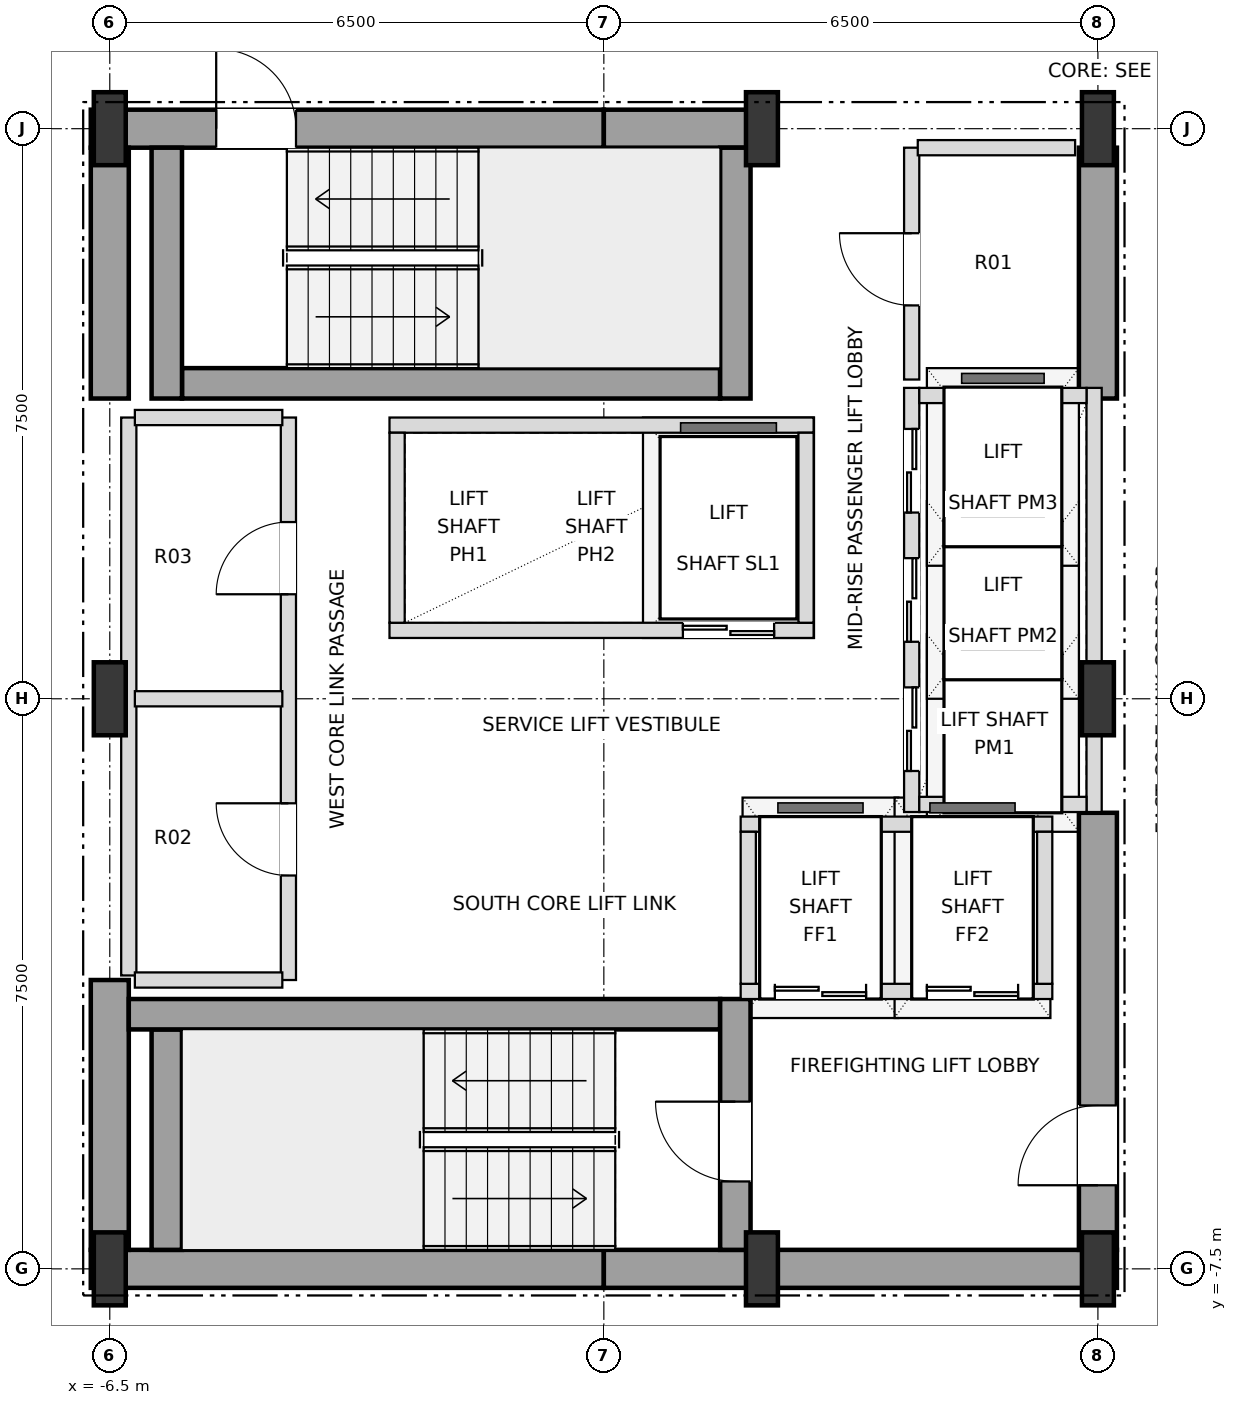
"""IFC4 building model, lengths in metres.
Left out: names, types, materials, properties, quantities, classifications, styles, units other than length and angle.
Written with IfcOpenShell. Run it as: python <this file> out.ifc"""

import sys

from ifc_helpers import new_model, si_unit, direction, frame, frame_2d, origin, origin_2d, place, context, subcontext, project, spatial, rectangle, i_section, extrude, element, fill, save


model = new_model("IFC4")
c1 = context("Model", 3, precision=1e-05, world=origin(), true_north=direction((0.0, 1.0)))
c2 = subcontext(c1, "Body", "Model", "MODEL_VIEW")
j1 = project(units=[si_unit("LENGTHUNIT", "METRE"), si_unit("PLANEANGLEUNIT", "RADIAN")], contexts=[c1])
p1 = place(None, origin())
s1 = spatial("IfcSite", under=j1, at=p1, CompositionType="ELEMENT")
p2 = place(p1, origin())
s2 = spatial("IfcBuilding", under=s1, at=p2, CompositionType="ELEMENT")
p3 = place(p2, frame((0.0, 0.0, 140.4)))
s3 = spatial("IfcBuildingStorey", under=s2, at=p3, CompositionType="ELEMENT", Elevation=140.4)
for number, where, z_axis, x_axis in (
    (1, (-6.5, -7.5, 0.0), (0.0, 0.0, 1.0), (1.0, 0.0, 0.0)),
    (2, (2.08, -7.5, 0.0), (0.0, 0.0, 1.0), (1.0, 0.0, 0.0)),
    (3, (6.5, -7.5, 0.0), (0.0, 0.0, 1.0), (1.0, 0.0, 0.0)),
    (4, (-6.5, 0.0, 0.0), (0.0, 0.0, 1.0), (1.0, 0.0, 0.0)),
    (5, (6.5, 0.0, 0.0), (0.0, 0.0, 1.0), (1.0, 0.0, 0.0)),
    (6, (-6.5, 7.5, 0.0), (0.0, 0.0, 1.0), (1.0, 0.0, 0.0)),
    (7, (2.08, 7.5, 0.0), (0.0, 0.0, 1.0), (1.0, 0.0, 0.0)),
    (8, (6.5, 7.5, 0.0), (0.0, 0.0, 1.0), (1.0, 0.0, 0.0)),
):
    element("IfcColumn", number, at=place(p3, frame(where, z_axis=z_axis, x_axis=x_axis)), inside=s3, PredefinedType="COLUMN", context=c2, shape_type="SweptSolid", body=[
        extrude(i_section(OverallWidth=0.42, OverallDepth=0.96, WebThickness=0.022, FlangeThickness=0.034, at=origin_2d()), origin(), (0.0, 0.0, 1.0), 3.6),
    ])
for number, where, z_axis, x_axis in (
    (9, (-6.75, -7.5, 0.0), (0.0, 0.0, 1.0), (1.0, 0.0, 0.0)),
    (10, (0.0, -7.5, 0.0), (0.0, 0.0, 1.0), (1.0, 0.0, 0.0)),
):
    element("IfcWall", number, at=place(p3, frame(where, z_axis=z_axis, x_axis=x_axis)), inside=s3, PredefinedType="SHEAR", context=c2, shape_type="SweptSolid", body=[
        extrude(rectangle(XDim=6.75, YDim=0.5, at=frame_2d((3.375, 0.0))), origin(), (0.0, 0.0, 1.0), 3.38),
    ])
p4 = place(p3, frame((-6.75, 7.5, 0.0), z_axis=(0.0, 0.0, 1.0), x_axis=(1.0, 0.0, 0.0)))
e11 = element("IfcWall", 11, at=p4, inside=s3, PredefinedType="SHEAR", context=c2, shape_type="SweptSolid", body=[
    extrude(rectangle(XDim=6.75, YDim=0.5, at=frame_2d((3.375, 0.0))), origin(), (0.0, 0.0, 1.0), 3.38),
])
p5 = place(p4, frame((1.65, 0.0, 0.0)))
e12 = element("IfcOpeningElement", 12, at=p5, cuts=e11, PredefinedType="OPENING", context=c2, shape_type="SweptSolid", body=[
    extrude(rectangle(XDim=1.05, YDim=2.15, at=frame_2d((0.525, 1.075))), frame((0.0, 0.26, 0.0), z_axis=(0.0, -1.0, 0.0), x_axis=(1.0, 0.0, 0.0)), (0.0, 0.0, 1.0), 0.52),
])
p6 = place(p3, frame((0.0, 7.5, 0.0), z_axis=(0.0, 0.0, 1.0), x_axis=(1.0, 0.0, 0.0)))
e13 = element("IfcWall", 13, at=p6, inside=s3, PredefinedType="SHEAR", context=c2, shape_type="SweptSolid", body=[
    extrude(rectangle(XDim=2.08, YDim=0.5, at=frame_2d((1.04, 0.0))), origin(), (0.0, 0.0, 1.0), 3.38),
])
p7 = place(p3, frame((-6.5, -7.25, 0.0), z_axis=(0.0, 0.0, 1.0), x_axis=(0.0, 1.0, 0.0)))
e14 = element("IfcWall", 14, at=p7, inside=s3, PredefinedType="SHEAR", context=c2, shape_type="SweptSolid", body=[
    extrude(rectangle(XDim=3.55, YDim=0.5, at=frame_2d((1.775, 0.0))), origin(), (0.0, 0.0, 1.0), 3.38),
])
p8 = place(p3, frame((-6.5, 3.95, 0.0), z_axis=(0.0, 0.0, 1.0), x_axis=(0.0, 1.0, 0.0)))
e15 = element("IfcWall", 15, at=p8, inside=s3, PredefinedType="SHEAR", context=c2, shape_type="SweptSolid", body=[
    extrude(rectangle(XDim=3.3, YDim=0.5, at=frame_2d((1.65, 0.0))), origin(), (0.0, 0.0, 1.0), 3.38),
])
p9 = place(p3, frame((6.5, -7.25, 0.0), z_axis=(0.0, 0.0, 1.0), x_axis=(0.0, 1.0, 0.0)))
e16 = element("IfcWall", 16, at=p9, inside=s3, PredefinedType="SHEAR", context=c2, shape_type="SweptSolid", body=[
    extrude(rectangle(XDim=5.75, YDim=0.5, at=frame_2d((2.875, 0.0))), origin(), (0.0, 0.0, 1.0), 3.38),
])
p10 = place(p9, frame((0.85, 0.0, 0.0)))
e17 = element("IfcOpeningElement", 17, at=p10, cuts=e16, PredefinedType="OPENING", context=c2, shape_type="SweptSolid", body=[
    extrude(rectangle(XDim=1.05, YDim=2.15, at=frame_2d((0.525, 1.075))), frame((0.0, 0.26, 0.0), z_axis=(0.0, -1.0, 0.0), x_axis=(1.0, 0.0, 0.0)), (0.0, 0.0, 1.0), 0.52),
])
p11 = place(p3, frame((6.5, 3.95, 0.0), z_axis=(0.0, 0.0, 1.0), x_axis=(0.0, 1.0, 0.0)))
e18 = element("IfcWall", 18, at=p11, inside=s3, PredefinedType="SHEAR", context=c2, shape_type="SweptSolid", body=[
    extrude(rectangle(XDim=3.3, YDim=0.5, at=frame_2d((1.65, 0.0))), origin(), (0.0, 0.0, 1.0), 3.38),
])
p12 = place(p3, frame((-5.75, -7.25, 0.0), z_axis=(0.0, 0.0, 1.0), x_axis=(0.0, 1.0, 0.0)))
e19 = element("IfcWall", 19, at=p12, inside=s3, PredefinedType="SHEAR", context=c2, shape_type="SweptSolid", body=[
    extrude(rectangle(XDim=2.9, YDim=0.4, at=frame_2d((1.45, 0.0))), origin(), (0.0, 0.0, 1.0), 3.38),
])
p13 = place(p3, frame((-6.25, -4.15, 0.0), z_axis=(0.0, 0.0, 1.0), x_axis=(1.0, 0.0, 0.0)))
e20 = element("IfcWall", 20, at=p13, inside=s3, PredefinedType="SHEAR", context=c2, shape_type="SweptSolid", body=[
    extrude(rectangle(XDim=7.78, YDim=0.4, at=frame_2d((3.89, 0.0))), origin(), (0.0, 0.0, 1.0), 3.38),
])
p14 = place(p3, frame((1.73, -7.25, 0.0), z_axis=(0.0, 0.0, 1.0), x_axis=(0.0, 1.0, 0.0)))
e21 = element("IfcWall", 21, at=p14, inside=s3, PredefinedType="SHEAR", context=c2, shape_type="SweptSolid", body=[
    extrude(rectangle(XDim=3.3, YDim=0.4, at=frame_2d((1.65, 0.0))), origin(), (0.0, 0.0, 1.0), 3.38),
])
p15 = place(p14, frame((0.9, 0.0, 0.0)))
e22 = element("IfcOpeningElement", 22, at=p15, cuts=e21, PredefinedType="OPENING", context=c2, shape_type="SweptSolid", body=[
    extrude(rectangle(XDim=1.05, YDim=2.15, at=frame_2d((0.525, 1.075))), frame((0.0, 0.21, 0.0), z_axis=(0.0, -1.0, 0.0), x_axis=(1.0, 0.0, 0.0)), (0.0, 0.0, 1.0), 0.42),
])
p16 = place(p3, frame((-5.55, 4.15, 0.0), z_axis=(0.0, 0.0, 1.0), x_axis=(1.0, 0.0, 0.0)))
e23 = element("IfcWall", 23, at=p16, inside=s3, PredefinedType="SHEAR", context=c2, shape_type="SweptSolid", body=[
    extrude(rectangle(XDim=7.08, YDim=0.4, at=frame_2d((3.54, 0.0))), origin(), (0.0, 0.0, 1.0), 3.38),
])
for number, where, z_axis, x_axis in (
    (24, (1.73, 3.95, 0.0), (0.0, 0.0, 1.0), (0.0, 1.0, 0.0)),
    (25, (-5.75, 3.95, 0.0), (0.0, 0.0, 1.0), (0.0, 1.0, 0.0)),
):
    element("IfcWall", number, at=place(p3, frame(where, z_axis=z_axis, x_axis=x_axis)), inside=s3, PredefinedType="SHEAR", context=c2, shape_type="SweptSolid", body=[
        extrude(rectangle(XDim=3.3, YDim=0.4, at=frame_2d((1.65, 0.0))), origin(), (0.0, 0.0, 1.0), 3.38),
    ])
p17 = place(p3, frame((4.05, -1.49, 0.0), z_axis=(0.0, 0.0, 1.0), x_axis=(0.0, 1.0, 0.0)))
e26 = element("IfcWall", 26, at=p17, inside=s3, PredefinedType="SOLIDWALL", context=c2, shape_type="SweptSolid", body=[
    extrude(rectangle(XDim=5.58, YDim=0.2, at=frame_2d((2.79, 0.0))), origin(), (0.0, 0.0, 1.0), 3.38),
])
p18 = place(p17, frame((0.54, 0.0, 0.0)))
e27 = element("IfcOpeningElement", 27, at=p18, cuts=e26, PredefinedType="OPENING", context=c2, shape_type="SweptSolid", body=[
    extrude(rectangle(XDim=1.1, YDim=2.15, at=frame_2d((0.55, 1.075))), frame((0.0, 0.11, 0.0), z_axis=(0.0, -1.0, 0.0), x_axis=(1.0, 0.0, 0.0)), (0.0, 0.0, 1.0), 0.22),
])
p19 = place(p17, frame((2.24, 0.0, 0.0)))
e28 = element("IfcOpeningElement", 28, at=p19, cuts=e26, PredefinedType="OPENING", context=c2, shape_type="SweptSolid", body=[
    extrude(rectangle(XDim=1.1, YDim=2.15, at=frame_2d((0.55, 1.075))), frame((0.0, 0.11, 0.0), z_axis=(0.0, -1.0, 0.0), x_axis=(1.0, 0.0, 0.0)), (0.0, 0.0, 1.0), 0.22),
])
p20 = place(p17, frame((3.94, 0.0, 0.0)))
e29 = element("IfcOpeningElement", 29, at=p20, cuts=e26, PredefinedType="OPENING", context=c2, shape_type="SweptSolid", body=[
    extrude(rectangle(XDim=1.1, YDim=2.15, at=frame_2d((0.55, 1.075))), frame((0.0, 0.11, 0.0), z_axis=(0.0, -1.0, 0.0), x_axis=(1.0, 0.0, 0.0)), (0.0, 0.0, 1.0), 0.22),
])
p21 = place(p3, frame((6.45, -1.49, 0.0), z_axis=(0.0, 0.0, 1.0), x_axis=(0.0, 1.0, 0.0)))
e30 = element("IfcWall", 30, at=p21, inside=s3, PredefinedType="SOLIDWALL", context=c2, shape_type="SweptSolid", body=[
    extrude(rectangle(XDim=5.58, YDim=0.2, at=frame_2d((2.79, 0.0))), origin(), (0.0, 0.0, 1.0), 2.816),
])
for number, where, z_axis, x_axis in (
    (31, (4.15, -1.39, 0.0), (0.0, 0.0, 1.0), (1.0, 0.0, 0.0)),
    (32, (4.15, 3.99, 0.0), (0.0, 0.0, 1.0), (1.0, 0.0, 0.0)),
):
    element("IfcWall", number, at=place(p3, frame(where, z_axis=z_axis, x_axis=x_axis)), inside=s3, PredefinedType="SOLIDWALL", context=c2, shape_type="SweptSolid", body=[
        extrude(rectangle(XDim=2.2, YDim=0.2, at=frame_2d((1.1, 0.0))), origin(), (0.0, 0.0, 1.0), 3.38),
    ])
p22 = place(p3, frame((-2.82, 0.9, 0.0), z_axis=(0.0, 0.0, 1.0), x_axis=(1.0, 0.0, 0.0)))
e33 = element("IfcWall", 33, at=p22, inside=s3, PredefinedType="SOLIDWALL", context=c2, shape_type="SweptSolid", body=[
    extrude(rectangle(XDim=5.58, YDim=0.2, at=frame_2d((2.79, 0.0))), origin(), (0.0, 0.0, 1.0), 3.38),
])
p23 = place(p22, frame((3.86, 0.0, 0.0)))
e34 = element("IfcOpeningElement", 34, at=p23, cuts=e33, PredefinedType="OPENING", context=c2, shape_type="SweptSolid", body=[
    extrude(rectangle(XDim=1.2, YDim=2.2, at=frame_2d((0.6, 1.1))), frame((0.0, 0.11, 0.0), z_axis=(0.0, -1.0, 0.0), x_axis=(1.0, 0.0, 0.0)), (0.0, 0.0, 1.0), 0.22),
])
p24 = place(p3, frame((-2.82, 3.6, 0.0), z_axis=(0.0, 0.0, 1.0), x_axis=(1.0, 0.0, 0.0)))
e35 = element("IfcWall", 35, at=p24, inside=s3, PredefinedType="SOLIDWALL", context=c2, shape_type="SweptSolid", body=[
    extrude(rectangle(XDim=5.58, YDim=0.2, at=frame_2d((2.79, 0.0))), origin(), (0.0, 0.0, 1.0), 3.38),
])
for number, where, z_axis, x_axis in (
    (36, (-2.72, 1.0, 0.0), (0.0, 0.0, 1.0), (0.0, 1.0, 0.0)),
    (37, (2.66, 1.0, 0.0), (0.0, 0.0, 1.0), (0.0, 1.0, 0.0)),
):
    element("IfcWall", number, at=place(p3, frame(where, z_axis=z_axis, x_axis=x_axis)), inside=s3, PredefinedType="SOLIDWALL", context=c2, shape_type="SweptSolid", body=[
        extrude(rectangle(XDim=2.5, YDim=0.2, at=frame_2d((1.25, 0.0))), origin(), (0.0, 0.0, 1.0), 3.38),
    ])
p25 = place(p3, frame((1.8, -3.85, 0.0), z_axis=(0.0, 0.0, 1.0), x_axis=(1.0, 0.0, 0.0)))
e38 = element("IfcWall", 38, at=p25, inside=s3, PredefinedType="SOLIDWALL", context=c2, shape_type="SweptSolid", body=[
    extrude(rectangle(XDim=4.1, YDim=0.2, at=frame_2d((2.05, 0.0))), origin(), (0.0, 0.0, 1.0), 3.38),
])
p26 = place(p25, frame((0.45, 0.0, 0.0)))
e39 = element("IfcOpeningElement", 39, at=p26, cuts=e38, PredefinedType="OPENING", context=c2, shape_type="SweptSolid", body=[
    extrude(rectangle(XDim=1.2, YDim=2.2, at=frame_2d((0.6, 1.1))), frame((0.0, 0.11, 0.0), z_axis=(0.0, -1.0, 0.0), x_axis=(1.0, 0.0, 0.0)), (0.0, 0.0, 1.0), 0.22),
])
p27 = place(p25, frame((2.45, 0.0, 0.0)))
e40 = element("IfcOpeningElement", 40, at=p27, cuts=e38, PredefinedType="OPENING", context=c2, shape_type="SweptSolid", body=[
    extrude(rectangle(XDim=1.2, YDim=2.2, at=frame_2d((0.6, 1.1))), frame((0.0, 0.11, 0.0), z_axis=(0.0, -1.0, 0.0), x_axis=(1.0, 0.0, 0.0)), (0.0, 0.0, 1.0), 0.22),
])
p28 = place(p3, frame((1.8, -1.65, 0.0), z_axis=(0.0, 0.0, 1.0), x_axis=(1.0, 0.0, 0.0)))
e41 = element("IfcWall", 41, at=p28, inside=s3, PredefinedType="SOLIDWALL", context=c2, shape_type="SweptSolid", body=[
    extrude(rectangle(XDim=4.1, YDim=0.2, at=frame_2d((2.05, 0.0))), origin(), (0.0, 0.0, 1.0), 3.38),
])
for number, where, z_axis, x_axis in (
    (42, (1.9, -3.75, 0.0), (0.0, 0.0, 1.0), (0.0, 1.0, 0.0)),
    (43, (5.8, -3.75, 0.0), (0.0, 0.0, 1.0), (0.0, 1.0, 0.0)),
):
    element("IfcWall", number, at=place(p3, frame(where, z_axis=z_axis, x_axis=x_axis)), inside=s3, PredefinedType="SOLIDWALL", context=c2, shape_type="SweptSolid", body=[
        extrude(rectangle(XDim=2.0, YDim=0.2, at=frame_2d((1.0, 0.0))), origin(), (0.0, 0.0, 1.0), 3.38),
    ])
p29 = place(p3, frame((-6.25, -3.64, 0.0), z_axis=(0.0, 0.0, 1.0), x_axis=(0.0, 1.0, 0.0)))
e44 = element("IfcWall", 44, at=p29, inside=s3, PredefinedType="SOLIDWALL", context=c2, shape_type="SweptSolid", body=[
    extrude(rectangle(XDim=7.34, YDim=0.2, at=frame_2d((3.67, 0.0))), origin(), (0.0, 0.0, 1.0), 3.38),
])
p30 = place(p3, frame((-4.15, -3.7, 0.0), z_axis=(0.0, 0.0, 1.0), x_axis=(0.0, 1.0, 0.0)))
e45 = element("IfcWall", 45, at=p30, inside=s3, PredefinedType="SOLIDWALL", context=c2, shape_type="SweptSolid", body=[
    extrude(rectangle(XDim=7.4, YDim=0.2, at=frame_2d((3.7, 0.0))), origin(), (0.0, 0.0, 1.0), 3.38),
])
p31 = place(p30, frame((1.375, 0.0, 0.0)))
e46 = element("IfcOpeningElement", 46, at=p31, cuts=e45, PredefinedType="OPENING", context=c2, shape_type="SweptSolid", body=[
    extrude(rectangle(XDim=0.95, YDim=2.15, at=frame_2d((0.475, 1.075))), frame((0.0, 0.11, 0.0), z_axis=(0.0, -1.0, 0.0), x_axis=(1.0, 0.0, 0.0)), (0.0, 0.0, 1.0), 0.22),
])
p32 = place(p30, frame((5.075, 0.0, 0.0)))
e47 = element("IfcOpeningElement", 47, at=p32, cuts=e45, PredefinedType="OPENING", context=c2, shape_type="SweptSolid", body=[
    extrude(rectangle(XDim=0.95, YDim=2.15, at=frame_2d((0.475, 1.075))), frame((0.0, 0.11, 0.0), z_axis=(0.0, -1.0, 0.0), x_axis=(1.0, 0.0, 0.0)), (0.0, 0.0, 1.0), 0.22),
])
p33 = place(p3, frame((4.05, 4.2, 0.0), z_axis=(0.0, 0.0, 1.0), x_axis=(0.0, 1.0, 0.0)))
e48 = element("IfcWall", 48, at=p33, inside=s3, PredefinedType="SOLIDWALL", context=c2, shape_type="SweptSolid", body=[
    extrude(rectangle(XDim=3.05, YDim=0.2, at=frame_2d((1.525, 0.0))), origin(), (0.0, 0.0, 1.0), 3.38),
])
p34 = place(p33, frame((0.975, 0.0, 0.0)))
e49 = element("IfcOpeningElement", 49, at=p34, cuts=e48, PredefinedType="OPENING", context=c2, shape_type="SweptSolid", body=[
    extrude(rectangle(XDim=0.95, YDim=2.15, at=frame_2d((0.475, 1.075))), frame((0.0, 0.11, 0.0), z_axis=(0.0, -1.0, 0.0), x_axis=(1.0, 0.0, 0.0)), (0.0, 0.0, 1.0), 0.22),
])
for number, where, z_axis, x_axis in (
    (50, (-6.17, -3.7, 0.0), (0.0, 0.0, 1.0), (1.0, 0.0, 0.0)),
    (51, (-6.17, 0.0, 0.0), (0.0, 0.0, 1.0), (1.0, 0.0, 0.0)),
    (52, (-6.17, 3.7, 0.0), (0.0, 0.0, 1.0), (1.0, 0.0, 0.0)),
):
    element("IfcWall", number, at=place(p3, frame(where, z_axis=z_axis, x_axis=x_axis)), inside=s3, PredefinedType="SOLIDWALL", context=c2, shape_type="SweptSolid", body=[
        extrude(rectangle(XDim=1.94, YDim=0.2, at=frame_2d((0.97, 0.0))), origin(), (0.0, 0.0, 1.0), 3.38),
    ])
p35 = place(p3, frame((4.13, 7.25, 0.0), z_axis=(0.0, 0.0, 1.0), x_axis=(1.0, 0.0, 0.0)))
e53 = element("IfcWall", 53, at=p35, inside=s3, PredefinedType="SOLIDWALL", context=c2, shape_type="SweptSolid", body=[
    extrude(rectangle(XDim=2.07, YDim=0.2, at=frame_2d((1.035, 0.0))), origin(), (0.0, 0.0, 1.0), 3.38),
])
p36 = place(p10, origin())
e54 = element("IfcDoor", 54, at=p36, inside=s3, OperationType="SINGLE_SWING_LEFT", PredefinedType="DOOR", context=c2, shape_type="SweptSolid", body=[
    extrude(rectangle(XDim=1.05, YDim=2.15, at=frame_2d((0.525, 1.075))), frame((0.0, 0.025, 0.0), z_axis=(0.0, -1.0, 0.0), x_axis=(1.0, 0.0, 0.0)), (0.0, 0.0, 1.0), 0.05),
])
fill(e17, e54)
p37 = place(p15, origin())
e55 = element("IfcDoor", 55, at=p37, inside=s3, OperationType="SINGLE_SWING_RIGHT", PredefinedType="DOOR", context=c2, shape_type="SweptSolid", body=[
    extrude(rectangle(XDim=1.05, YDim=2.15, at=frame_2d((0.525, 1.075))), frame((0.0, 0.025, 0.0), z_axis=(0.0, -1.0, 0.0), x_axis=(1.0, 0.0, 0.0)), (0.0, 0.0, 1.0), 0.05),
])
fill(e22, e55)
p38 = place(p5, origin())
e56 = element("IfcDoor", 56, at=p38, inside=s3, OperationType="SINGLE_SWING_LEFT", PredefinedType="DOOR", context=c2, shape_type="SweptSolid", body=[
    extrude(rectangle(XDim=1.05, YDim=2.15, at=frame_2d((0.525, 1.075))), frame((0.0, 0.025, 0.0), z_axis=(0.0, -1.0, 0.0), x_axis=(1.0, 0.0, 0.0)), (0.0, 0.0, 1.0), 0.05),
])
fill(e12, e56)
p39 = place(p18, origin())
e57 = element("IfcDoor", 57, at=p39, inside=s3, OperationType="DOUBLE_DOOR_SLIDING", PredefinedType="DOOR", context=c2, shape_type="SweptSolid", body=[
    extrude(rectangle(XDim=1.1, YDim=2.15, at=frame_2d((0.55, 1.075))), frame((0.0, 0.025, 0.0), z_axis=(0.0, -1.0, 0.0), x_axis=(1.0, 0.0, 0.0)), (0.0, 0.0, 1.0), 0.05),
])
fill(e27, e57)
p40 = place(p19, origin())
e58 = element("IfcDoor", 58, at=p40, inside=s3, OperationType="DOUBLE_DOOR_SLIDING", PredefinedType="DOOR", context=c2, shape_type="SweptSolid", body=[
    extrude(rectangle(XDim=1.1, YDim=2.15, at=frame_2d((0.55, 1.075))), frame((0.0, 0.025, 0.0), z_axis=(0.0, -1.0, 0.0), x_axis=(1.0, 0.0, 0.0)), (0.0, 0.0, 1.0), 0.05),
])
fill(e28, e58)
p41 = place(p20, origin())
e59 = element("IfcDoor", 59, at=p41, inside=s3, OperationType="DOUBLE_DOOR_SLIDING", PredefinedType="DOOR", context=c2, shape_type="SweptSolid", body=[
    extrude(rectangle(XDim=1.1, YDim=2.15, at=frame_2d((0.55, 1.075))), frame((0.0, 0.025, 0.0), z_axis=(0.0, -1.0, 0.0), x_axis=(1.0, 0.0, 0.0)), (0.0, 0.0, 1.0), 0.05),
])
fill(e29, e59)
p42 = place(p23, origin())
e60 = element("IfcDoor", 60, at=p42, inside=s3, OperationType="DOUBLE_DOOR_SLIDING", PredefinedType="DOOR", context=c2, shape_type="SweptSolid", body=[
    extrude(rectangle(XDim=1.2, YDim=2.2, at=frame_2d((0.6, 1.1))), frame((0.0, 0.025, 0.0), z_axis=(0.0, -1.0, 0.0), x_axis=(1.0, 0.0, 0.0)), (0.0, 0.0, 1.0), 0.05),
])
fill(e34, e60)
p43 = place(p26, origin())
e61 = element("IfcDoor", 61, at=p43, inside=s3, OperationType="DOUBLE_DOOR_SLIDING", PredefinedType="DOOR", context=c2, shape_type="SweptSolid", body=[
    extrude(rectangle(XDim=1.2, YDim=2.2, at=frame_2d((0.6, 1.1))), frame((0.0, 0.025, 0.0), z_axis=(0.0, -1.0, 0.0), x_axis=(1.0, 0.0, 0.0)), (0.0, 0.0, 1.0), 0.05),
])
fill(e39, e61)
p44 = place(p27, origin())
e62 = element("IfcDoor", 62, at=p44, inside=s3, OperationType="DOUBLE_DOOR_SLIDING", PredefinedType="DOOR", context=c2, shape_type="SweptSolid", body=[
    extrude(rectangle(XDim=1.2, YDim=2.2, at=frame_2d((0.6, 1.1))), frame((0.0, 0.025, 0.0), z_axis=(0.0, -1.0, 0.0), x_axis=(1.0, 0.0, 0.0)), (0.0, 0.0, 1.0), 0.05),
])
fill(e40, e62)
p45 = place(p31, origin())
e63 = element("IfcDoor", 63, at=p45, inside=s3, OperationType="SINGLE_SWING_RIGHT", PredefinedType="DOOR", context=c2, shape_type="SweptSolid", body=[
    extrude(rectangle(XDim=0.95, YDim=2.15, at=frame_2d((0.475, 1.075))), frame((0.0, 0.025, 0.0), z_axis=(0.0, -1.0, 0.0), x_axis=(1.0, 0.0, 0.0)), (0.0, 0.0, 1.0), 0.05),
])
fill(e46, e63)
p46 = place(p32, origin())
e64 = element("IfcDoor", 64, at=p46, inside=s3, OperationType="SINGLE_SWING_LEFT", PredefinedType="DOOR", context=c2, shape_type="SweptSolid", body=[
    extrude(rectangle(XDim=0.95, YDim=2.15, at=frame_2d((0.475, 1.075))), frame((0.0, 0.025, 0.0), z_axis=(0.0, -1.0, 0.0), x_axis=(1.0, 0.0, 0.0)), (0.0, 0.0, 1.0), 0.05),
])
fill(e47, e64)
p47 = place(p34, origin())
e65 = element("IfcDoor", 65, at=p47, inside=s3, OperationType="SINGLE_SWING_RIGHT", PredefinedType="DOOR", context=c2, shape_type="SweptSolid", body=[
    extrude(rectangle(XDim=0.95, YDim=2.15, at=frame_2d((0.475, 1.075))), frame((0.0, 0.025, 0.0), z_axis=(0.0, -1.0, 0.0), x_axis=(1.0, 0.0, 0.0)), (0.0, 0.0, 1.0), 0.05),
])
fill(e49, e65)
save(model, sys.argv[1])
